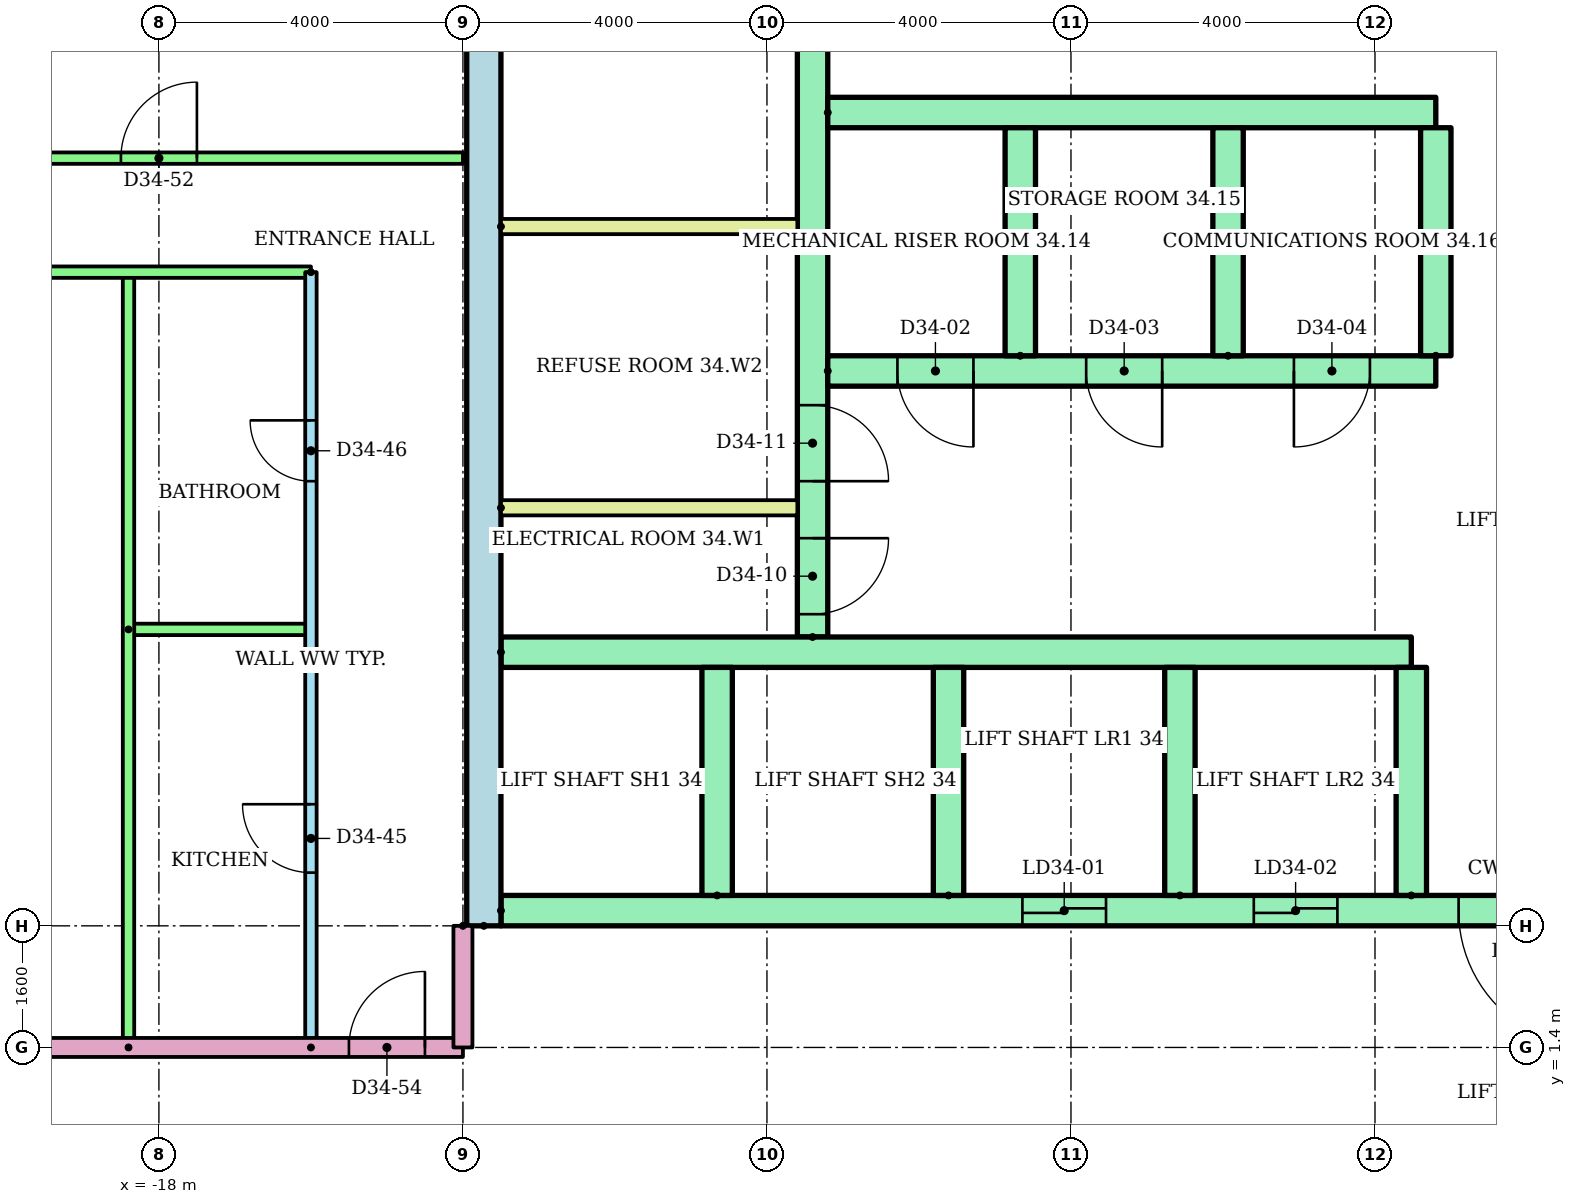
"""IFC4 building model, lengths in metres.
Left out: names, types, materials, properties, quantities, classifications, styles, units other than length and angle.
Written with IfcOpenShell. Run it as: python <this file> out.ifc"""

import sys

from ifc_helpers import new_model, si_unit, direction, frame, frame_2d, origin, place, context, subcontext, project, spatial, rectangle, extrude, element, fill, save


model = new_model("IFC4")
c1 = context("Model", 3, precision=1e-05, world=origin(), true_north=direction((0.0, 1.0)))
c2 = subcontext(c1, "Body", "Model", "MODEL_VIEW")
j1 = project(units=[si_unit("LENGTHUNIT", "METRE"), si_unit("PLANEANGLEUNIT", "RADIAN")], contexts=[c1])
p1 = place(None, origin())
s1 = spatial("IfcSite", under=j1, at=p1, CompositionType="ELEMENT")
p2 = place(p1, origin())
s2 = spatial("IfcBuilding", under=s1, at=p2, CompositionType="ELEMENT")
p3 = place(p2, frame((0.0, 0.0, 132.6)))
s3 = spatial("IfcBuildingStorey", under=s2, at=p3, CompositionType="ELEMENT", Elevation=132.6)
p4 = place(p3, frame((-13.725, 3.0, 0.0), z_axis=(0.0, 0.0, 1.0), x_axis=(0.0, 1.0, 0.0)))
e1 = element("IfcWall", 1, at=p4, inside=s3, PredefinedType="SHEAR", context=c2, shape_type="SweptSolid", body=[
    extrude(rectangle(XDim=17.0, YDim=0.45, at=frame_2d((8.5, 0.0))), origin(), (0.0, 0.0, 1.0), 2.92),
])
p5 = place(p3, frame((-9.4, 6.8, 0.0), z_axis=(0.0, 0.0, 1.0), x_axis=(0.0, 1.0, 0.0)))
e2 = element("IfcWall", 2, at=p5, inside=s3, PredefinedType="SHEAR", context=c2, shape_type="SweptSolid", body=[
    extrude(rectangle(XDim=12.7, YDim=0.4, at=frame_2d((6.35, 0.0))), origin(), (0.0, 0.0, 1.0), 2.92),
])
p6 = place(p5, frame((0.3, 0.0, 0.0)))
e3 = element("IfcOpeningElement", 3, at=p6, cuts=e2, PredefinedType="OPENING", context=c2, shape_type="SweptSolid", body=[
    extrude(rectangle(XDim=1.0, YDim=2.1, at=frame_2d((0.5, 1.05))), frame((0.0, 0.21, 0.0), z_axis=(0.0, -1.0, 0.0), x_axis=(1.0, 0.0, 0.0)), (0.0, 0.0, 1.0), 0.42),
])
p7 = place(p5, frame((2.05, 0.0, 0.0)))
e4 = element("IfcOpeningElement", 4, at=p7, cuts=e2, PredefinedType="OPENING", context=c2, shape_type="SweptSolid", body=[
    extrude(rectangle(XDim=1.0, YDim=2.1, at=frame_2d((0.5, 1.05))), frame((0.0, 0.21, 0.0), z_axis=(0.0, -1.0, 0.0), x_axis=(1.0, 0.0, 0.0)), (0.0, 0.0, 1.0), 0.42),
])
p8 = place(p5, frame((7.925, 0.0, 0.0)))
e5 = element("IfcOpeningElement", 5, at=p8, cuts=e2, PredefinedType="OPENING", context=c2, shape_type="SweptSolid", body=[
    extrude(rectangle(XDim=1.0, YDim=2.1, at=frame_2d((0.5, 1.05))), frame((0.0, 0.21, 0.0), z_axis=(0.0, -1.0, 0.0), x_axis=(1.0, 0.0, 0.0)), (0.0, 0.0, 1.0), 0.42),
])
p9 = place(p3, frame((-13.5, 3.2, 0.0)))
e6 = element("IfcWall", 6, at=p9, inside=s3, PredefinedType="SHEAR", context=c2, shape_type="SweptSolid", body=[
    extrude(rectangle(XDim=27.0, YDim=0.4, at=frame_2d((13.5, 0.0))), origin(), (0.0, 0.0, 1.0), 2.92),
])
p10 = place(p9, frame((6.861, 0.0, 0.0)))
e7 = element("IfcOpeningElement", 7, at=p10, cuts=e6, PredefinedType="OPENING", context=c2, shape_type="SweptSolid", body=[
    extrude(rectangle(XDim=1.1, YDim=2.1, at=frame_2d((0.55, 1.05))), frame((0.0, 0.21, 0.0), z_axis=(0.0, -1.0, 0.0), x_axis=(1.0, 0.0, 0.0)), (0.0, 0.0, 1.0), 0.42),
])
p11 = place(p9, frame((9.906, 0.0, 0.0)))
e8 = element("IfcOpeningElement", 8, at=p11, cuts=e6, PredefinedType="OPENING", context=c2, shape_type="SweptSolid", body=[
    extrude(rectangle(XDim=1.1, YDim=2.1, at=frame_2d((0.55, 1.05))), frame((0.0, 0.21, 0.0), z_axis=(0.0, -1.0, 0.0), x_axis=(1.0, 0.0, 0.0)), (0.0, 0.0, 1.0), 0.42),
])
p12 = place(p9, frame((15.994, 0.0, 0.0)))
e9 = element("IfcOpeningElement", 9, at=p12, cuts=e6, PredefinedType="OPENING", context=c2, shape_type="SweptSolid", body=[
    extrude(rectangle(XDim=1.1, YDim=2.1, at=frame_2d((0.55, 1.05))), frame((0.0, 0.21, 0.0), z_axis=(0.0, -1.0, 0.0), x_axis=(1.0, 0.0, 0.0)), (0.0, 0.0, 1.0), 0.42),
])
p13 = place(p9, frame((19.039, 0.0, 0.0)))
e10 = element("IfcOpeningElement", 10, at=p13, cuts=e6, PredefinedType="OPENING", context=c2, shape_type="SweptSolid", body=[
    extrude(rectangle(XDim=1.1, YDim=2.1, at=frame_2d((0.55, 1.05))), frame((0.0, 0.21, 0.0), z_axis=(0.0, -1.0, 0.0), x_axis=(1.0, 0.0, 0.0)), (0.0, 0.0, 1.0), 0.42),
])
p14 = place(p9, frame((12.6, 0.0, 0.0)))
e11 = element("IfcOpeningElement", 11, at=p14, cuts=e6, PredefinedType="OPENING", context=c2, shape_type="SweptSolid", body=[
    extrude(rectangle(XDim=1.8, YDim=2.1, at=frame_2d((0.9, 1.05))), frame((0.0, 0.21, 0.0), z_axis=(0.0, -1.0, 0.0), x_axis=(1.0, 0.0, 0.0)), (0.0, 0.0, 1.0), 0.42),
])
p15 = place(p3, frame((-13.5, 6.6, 0.0)))
e12 = element("IfcWall", 12, at=p15, inside=s3, PredefinedType="SHEAR", context=c2, shape_type="SweptSolid", body=[
    extrude(rectangle(XDim=11.978, YDim=0.4, at=frame_2d((5.989, 0.0))), origin(), (0.0, 0.0, 1.0), 2.92),
])
for number, where, z_axis, x_axis in (
    (13, (-10.656, 3.4, 0.0), (0.0, 0.0, 1.0), (0.0, 1.0, 0.0)),
    (14, (-7.611, 3.4, 0.0), (0.0, 0.0, 1.0), (0.0, 1.0, 0.0)),
    (15, (-4.567, 3.4, 0.0), (0.0, 0.0, 1.0), (0.0, 1.0, 0.0)),
    (16, (-1.522, 3.4, 0.0), (0.0, 0.0, 1.0), (0.0, 1.0, 0.0)),
):
    element("IfcWall", number, at=place(p3, frame(where, z_axis=z_axis, x_axis=x_axis)), inside=s3, PredefinedType="SHEAR", context=c2, shape_type="SweptSolid", body=[
        extrude(rectangle(XDim=3.0, YDim=0.4, at=frame_2d((1.5, 0.0))), origin(), (0.0, 0.0, 1.0), 2.92),
    ])
p16 = place(p3, frame((-9.2, 10.3, 0.0)))
e17 = element("IfcWall", 17, at=p16, inside=s3, PredefinedType="SHEAR", context=c2, shape_type="SweptSolid", body=[
    extrude(rectangle(XDim=8.0, YDim=0.4, at=frame_2d((4.0, 0.0))), origin(), (0.0, 0.0, 1.0), 2.92),
])
p17 = place(p16, frame((0.917, 0.0, 0.0)))
e18 = element("IfcOpeningElement", 18, at=p17, cuts=e17, PredefinedType="OPENING", context=c2, shape_type="SweptSolid", body=[
    extrude(rectangle(XDim=1.0, YDim=2.1, at=frame_2d((0.5, 1.05))), frame((0.0, 0.21, 0.0), z_axis=(0.0, -1.0, 0.0), x_axis=(1.0, 0.0, 0.0)), (0.0, 0.0, 1.0), 0.42),
])
p18 = place(p16, frame((3.4, 0.0, 0.0)))
e19 = element("IfcOpeningElement", 19, at=p18, cuts=e17, PredefinedType="OPENING", context=c2, shape_type="SweptSolid", body=[
    extrude(rectangle(XDim=1.0, YDim=2.1, at=frame_2d((0.5, 1.05))), frame((0.0, 0.21, 0.0), z_axis=(0.0, -1.0, 0.0), x_axis=(1.0, 0.0, 0.0)), (0.0, 0.0, 1.0), 0.42),
])
p19 = place(p16, frame((6.133, 0.0, 0.0)))
e20 = element("IfcOpeningElement", 20, at=p19, cuts=e17, PredefinedType="OPENING", context=c2, shape_type="SweptSolid", body=[
    extrude(rectangle(XDim=1.0, YDim=2.1, at=frame_2d((0.5, 1.05))), frame((0.0, 0.21, 0.0), z_axis=(0.0, -1.0, 0.0), x_axis=(1.0, 0.0, 0.0)), (0.0, 0.0, 1.0), 0.42),
])
p20 = place(p3, frame((-9.2, 13.7, 0.0)))
e21 = element("IfcWall", 21, at=p20, inside=s3, PredefinedType="SHEAR", context=c2, shape_type="SweptSolid", body=[
    extrude(rectangle(XDim=8.0, YDim=0.4, at=frame_2d((4.0, 0.0))), origin(), (0.0, 0.0, 1.0), 2.92),
])
for number, where, z_axis, x_axis in (
    (22, (-6.667, 10.5, 0.0), (0.0, 0.0, 1.0), (0.0, 1.0, 0.0)),
    (23, (-3.933, 10.5, 0.0), (0.0, 0.0, 1.0), (0.0, 1.0, 0.0)),
    (24, (-1.2, 10.5, 0.0), (0.0, 0.0, 1.0), (0.0, 1.0, 0.0)),
):
    element("IfcWall", number, at=place(p3, frame(where, z_axis=z_axis, x_axis=x_axis)), inside=s3, PredefinedType="SHEAR", context=c2, shape_type="SweptSolid", body=[
        extrude(rectangle(XDim=3.0, YDim=0.4, at=frame_2d((1.5, 0.0))), origin(), (0.0, 0.0, 1.0), 2.92),
    ])
for number, where in (
    (25, (-13.5, 8.5, 0.0)),
    (26, (-13.5, 12.2, 0.0)),
):
    element("IfcWall", number, at=place(p3, frame(where)), inside=s3, PredefinedType="PARTITIONING", context=c2, shape_type="SweptSolid", body=[
        extrude(rectangle(XDim=3.9, YDim=0.2, at=frame_2d((1.95, 0.0))), origin(), (0.0, 0.0, 1.0), 2.92),
    ])
p21 = place(p3, frame((-16.0, 1.4, 0.0), z_axis=(0.0, 0.0, 1.0), x_axis=(0.0, 1.0, 0.0)))
e27 = element("IfcWall", 27, at=p21, inside=s3, PredefinedType="PARTITIONING", context=c2, shape_type="SweptSolid", body=[
    extrude(rectangle(XDim=10.2, YDim=0.15, at=frame_2d((5.1, 0.0))), origin(), (0.0, 0.0, 1.0), 2.4),
])
p22 = place(p21, frame((2.3, 0.0, 0.0)))
e28 = element("IfcOpeningElement", 28, at=p22, cuts=e27, PredefinedType="OPENING", context=c2, shape_type="SweptSolid", body=[
    extrude(rectangle(XDim=0.9, YDim=2.1, at=frame_2d((0.45, 1.05))), frame((0.0, 0.085, 0.0), z_axis=(0.0, -1.0, 0.0), x_axis=(1.0, 0.0, 0.0)), (0.0, 0.0, 1.0), 0.17),
])
p23 = place(p21, frame((7.45, 0.0, 0.0)))
e29 = element("IfcOpeningElement", 29, at=p23, cuts=e27, PredefinedType="OPENING", context=c2, shape_type="SweptSolid", body=[
    extrude(rectangle(XDim=0.8, YDim=2.1, at=frame_2d((0.4, 1.05))), frame((0.0, 0.085, 0.0), z_axis=(0.0, -1.0, 0.0), x_axis=(1.0, 0.0, 0.0)), (0.0, 0.0, 1.0), 0.17),
])
p24 = place(p3, frame((-18.4, 6.9, 0.0)))
e30 = element("IfcWall", 30, at=p24, inside=s3, PredefinedType="PARTITIONING", context=c2, shape_type="SweptSolid", body=[
    extrude(rectangle(XDim=2.4, YDim=0.15, at=frame_2d((1.2, 0.0))), origin(), (0.0, 0.0, 1.0), 2.4),
])
p25 = place(p3, frame((-18.4, 1.4, 0.0), z_axis=(0.0, 0.0, 1.0), x_axis=(0.0, 1.0, 0.0)))
e31 = element("IfcWall", 31, at=p25, inside=s3, PredefinedType="PARTITIONING", context=c2, shape_type="SweptSolid", body=[
    extrude(rectangle(XDim=10.2, YDim=0.15, at=frame_2d((5.1, 0.0))), origin(), (0.0, 0.0, 1.0), 2.4),
])
p26 = place(p3, frame((-16.0, 11.6, 0.0), z_axis=(0.0, 0.0, 1.0), x_axis=(-1.0, 0.0, 0.0)))
e32 = element("IfcWall", 32, at=p26, inside=s3, PredefinedType="PARTITIONING", context=c2, shape_type="SweptSolid", body=[
    extrude(rectangle(XDim=16.72, YDim=0.15, at=frame_2d((8.36, 0.0))), origin(), (0.0, 0.0, 1.0), 2.4),
])
p27 = place(p26, frame((4.482, 0.0, 0.0)))
e33 = element("IfcOpeningElement", 33, at=p27, cuts=e32, PredefinedType="OPENING", context=c2, shape_type="SweptSolid", body=[
    extrude(rectangle(XDim=0.9, YDim=2.1, at=frame_2d((0.45, 1.05))), frame((0.0, 0.085, 0.0), z_axis=(0.0, -1.0, 0.0), x_axis=(1.0, 0.0, 0.0)), (0.0, 0.0, 1.0), 0.17),
])
p28 = place(p26, frame((10.325, 0.0, 0.0)))
e34 = element("IfcOpeningElement", 34, at=p28, cuts=e32, PredefinedType="OPENING", context=c2, shape_type="SweptSolid", body=[
    extrude(rectangle(XDim=0.9, YDim=2.1, at=frame_2d((0.45, 1.05))), frame((0.0, 0.085, 0.0), z_axis=(0.0, -1.0, 0.0), x_axis=(1.0, 0.0, 0.0)), (0.0, 0.0, 1.0), 0.17),
])
p29 = place(p26, frame((14.618, 0.0, 0.0)))
e35 = element("IfcOpeningElement", 35, at=p29, cuts=e32, PredefinedType="OPENING", context=c2, shape_type="SweptSolid", body=[
    extrude(rectangle(XDim=0.9, YDim=2.1, at=frame_2d((0.45, 1.05))), frame((0.0, 0.085, 0.0), z_axis=(0.0, -1.0, 0.0), x_axis=(1.0, 0.0, 0.0)), (0.0, 0.0, 1.0), 0.17),
])
p30 = place(p3, frame((-32.72, 13.1, 0.0)))
e36 = element("IfcWall", 36, at=p30, inside=s3, PredefinedType="PARTITIONING", context=c2, shape_type="SweptSolid", body=[
    extrude(rectangle(XDim=18.72, YDim=0.15, at=frame_2d((9.36, 0.0))), origin(), (0.0, 0.0, 1.0), 2.4),
])
p31 = place(p30, frame((2.02, 0.0, 0.0)))
e37 = element("IfcOpeningElement", 37, at=p31, cuts=e36, PredefinedType="OPENING", context=c2, shape_type="SweptSolid", body=[
    extrude(rectangle(XDim=0.9, YDim=2.1, at=frame_2d((0.45, 1.05))), frame((0.0, 0.085, 0.0), z_axis=(0.0, -1.0, 0.0), x_axis=(1.0, 0.0, 0.0)), (0.0, 0.0, 1.0), 0.17),
])
p32 = place(p30, frame((7.47, 0.0, 0.0)))
e38 = element("IfcOpeningElement", 38, at=p32, cuts=e36, PredefinedType="OPENING", context=c2, shape_type="SweptSolid", body=[
    extrude(rectangle(XDim=0.9, YDim=2.1, at=frame_2d((0.45, 1.05))), frame((0.0, 0.085, 0.0), z_axis=(0.0, -1.0, 0.0), x_axis=(1.0, 0.0, 0.0)), (0.0, 0.0, 1.0), 0.17),
])
p33 = place(p30, frame((14.22, 0.0, 0.0)))
e39 = element("IfcOpeningElement", 39, at=p33, cuts=e36, PredefinedType="OPENING", context=c2, shape_type="SweptSolid", body=[
    extrude(rectangle(XDim=1.0, YDim=2.1, at=frame_2d((0.5, 1.05))), frame((0.0, 0.085, 0.0), z_axis=(0.0, -1.0, 0.0), x_axis=(1.0, 0.0, 0.0)), (0.0, 0.0, 1.0), 0.17),
])
p34 = place(p3, frame((-29.0, 1.4, 0.0)))
e40 = element("IfcWall", 40, at=p34, inside=s3, PredefinedType="PARTITIONING", context=c2, shape_type="SweptSolid", body=[
    extrude(rectangle(XDim=15.0, YDim=0.25, at=frame_2d((7.5, 0.0))), origin(), (0.0, 0.0, 1.0), 2.4),
])
p35 = place(p34, frame((13.5, 0.0, 0.0)))
e41 = element("IfcOpeningElement", 41, at=p35, cuts=e40, PredefinedType="OPENING", context=c2, shape_type="SweptSolid", body=[
    extrude(rectangle(XDim=1.0, YDim=2.1, at=frame_2d((0.5, 1.05))), frame((0.0, 0.135, 0.0), z_axis=(0.0, -1.0, 0.0), x_axis=(1.0, 0.0, 0.0)), (0.0, 0.0, 1.0), 0.27),
])
p36 = place(p3, frame((-14.0, 3.0, 0.0), z_axis=(0.0, 0.0, 1.0), x_axis=(0.0, -1.0, 0.0)))
e42 = element("IfcWall", 42, at=p36, inside=s3, PredefinedType="PARTITIONING", context=c2, shape_type="SweptSolid", body=[
    extrude(rectangle(XDim=1.6, YDim=0.25, at=frame_2d((0.8, 0.0))), origin(), (0.0, 0.0, 1.0), 2.4),
])
p37 = place(p10, origin())
e43 = element("IfcDoor", 43, at=p37, inside=s3, OperationType="SLIDING_TO_LEFT", PredefinedType="DOOR", context=c2, shape_type="SweptSolid", body=[
    extrude(rectangle(XDim=1.1, YDim=2.1, at=frame_2d((0.55, 1.05))), frame((0.0, 0.025, 0.0), z_axis=(0.0, -1.0, 0.0), x_axis=(1.0, 0.0, 0.0)), (0.0, 0.0, 1.0), 0.05),
])
fill(e7, e43)
p38 = place(p11, origin())
e44 = element("IfcDoor", 44, at=p38, inside=s3, OperationType="SLIDING_TO_LEFT", PredefinedType="DOOR", context=c2, shape_type="SweptSolid", body=[
    extrude(rectangle(XDim=1.1, YDim=2.1, at=frame_2d((0.55, 1.05))), frame((0.0, 0.025, 0.0), z_axis=(0.0, -1.0, 0.0), x_axis=(1.0, 0.0, 0.0)), (0.0, 0.0, 1.0), 0.05),
])
fill(e8, e44)
p39 = place(p14, frame((1.8, 0.0, 0.0), z_axis=(0.0, 0.0, 1.0), x_axis=(-1.0, 0.0, 0.0)))
e45 = element("IfcDoor", 45, at=p39, inside=s3, OperationType="DOUBLE_DOOR_SINGLE_SWING", PredefinedType="DOOR", context=c2, shape_type="SweptSolid", body=[
    extrude(rectangle(XDim=1.8, YDim=2.1, at=frame_2d((0.9, 1.05))), frame((0.0, 0.025, 0.0), z_axis=(0.0, -1.0, 0.0), x_axis=(1.0, 0.0, 0.0)), (0.0, 0.0, 1.0), 0.05),
])
fill(e11, e45)
p40 = place(p17, frame((1.0, 0.0, 0.0), z_axis=(0.0, 0.0, 1.0), x_axis=(-1.0, 0.0, 0.0)))
e46 = element("IfcDoor", 46, at=p40, inside=s3, OperationType="SINGLE_SWING_RIGHT", PredefinedType="DOOR", context=c2, shape_type="SweptSolid", body=[
    extrude(rectangle(XDim=1.0, YDim=2.1, at=frame_2d((0.5, 1.05))), frame((0.0, 0.025, 0.0), z_axis=(0.0, -1.0, 0.0), x_axis=(1.0, 0.0, 0.0)), (0.0, 0.0, 1.0), 0.05),
])
fill(e18, e46)
p41 = place(p18, frame((1.0, 0.0, 0.0), z_axis=(0.0, 0.0, 1.0), x_axis=(-1.0, 0.0, 0.0)))
e47 = element("IfcDoor", 47, at=p41, inside=s3, OperationType="SINGLE_SWING_RIGHT", PredefinedType="DOOR", context=c2, shape_type="SweptSolid", body=[
    extrude(rectangle(XDim=1.0, YDim=2.1, at=frame_2d((0.5, 1.05))), frame((0.0, 0.025, 0.0), z_axis=(0.0, -1.0, 0.0), x_axis=(1.0, 0.0, 0.0)), (0.0, 0.0, 1.0), 0.05),
])
fill(e19, e47)
p42 = place(p19, frame((1.0, 0.0, 0.0), z_axis=(0.0, 0.0, 1.0), x_axis=(-1.0, 0.0, 0.0)))
e48 = element("IfcDoor", 48, at=p42, inside=s3, OperationType="SINGLE_SWING_LEFT", PredefinedType="DOOR", context=c2, shape_type="SweptSolid", body=[
    extrude(rectangle(XDim=1.0, YDim=2.1, at=frame_2d((0.5, 1.05))), frame((0.0, 0.025, 0.0), z_axis=(0.0, -1.0, 0.0), x_axis=(1.0, 0.0, 0.0)), (0.0, 0.0, 1.0), 0.05),
])
fill(e20, e48)
p43 = place(p6, frame((1.0, 0.0, 0.0), z_axis=(0.0, 0.0, 1.0), x_axis=(-1.0, 0.0, 0.0)))
e49 = element("IfcDoor", 49, at=p43, inside=s3, OperationType="SINGLE_SWING_RIGHT", PredefinedType="DOOR", context=c2, shape_type="SweptSolid", body=[
    extrude(rectangle(XDim=1.0, YDim=2.1, at=frame_2d((0.5, 1.05))), frame((0.0, 0.025, 0.0), z_axis=(0.0, -1.0, 0.0), x_axis=(1.0, 0.0, 0.0)), (0.0, 0.0, 1.0), 0.05),
])
fill(e3, e49)
p44 = place(p7, frame((1.0, 0.0, 0.0), z_axis=(0.0, 0.0, 1.0), x_axis=(-1.0, 0.0, 0.0)))
e50 = element("IfcDoor", 50, at=p44, inside=s3, OperationType="SINGLE_SWING_LEFT", PredefinedType="DOOR", context=c2, shape_type="SweptSolid", body=[
    extrude(rectangle(XDim=1.0, YDim=2.1, at=frame_2d((0.5, 1.05))), frame((0.0, 0.025, 0.0), z_axis=(0.0, -1.0, 0.0), x_axis=(1.0, 0.0, 0.0)), (0.0, 0.0, 1.0), 0.05),
])
fill(e4, e50)
p45 = place(p22, origin())
e51 = element("IfcDoor", 51, at=p45, inside=s3, OperationType="SINGLE_SWING_RIGHT", PredefinedType="DOOR", context=c2, shape_type="SweptSolid", body=[
    extrude(rectangle(XDim=0.9, YDim=2.1, at=frame_2d((0.45, 1.05))), frame((0.0, 0.025, 0.0), z_axis=(0.0, -1.0, 0.0), x_axis=(1.0, 0.0, 0.0)), (0.0, 0.0, 1.0), 0.05),
])
fill(e28, e51)
p46 = place(p23, origin())
e52 = element("IfcDoor", 52, at=p46, inside=s3, OperationType="SINGLE_SWING_RIGHT", PredefinedType="DOOR", context=c2, shape_type="SweptSolid", body=[
    extrude(rectangle(XDim=0.8, YDim=2.1, at=frame_2d((0.4, 1.05))), frame((0.0, 0.025, 0.0), z_axis=(0.0, -1.0, 0.0), x_axis=(1.0, 0.0, 0.0)), (0.0, 0.0, 1.0), 0.05),
])
fill(e29, e52)
p47 = place(p33, origin())
e53 = element("IfcDoor", 53, at=p47, inside=s3, OperationType="SINGLE_SWING_RIGHT", PredefinedType="DOOR", context=c2, shape_type="SweptSolid", body=[
    extrude(rectangle(XDim=1.0, YDim=2.1, at=frame_2d((0.5, 1.05))), frame((0.0, 0.025, 0.0), z_axis=(0.0, -1.0, 0.0), x_axis=(1.0, 0.0, 0.0)), (0.0, 0.0, 1.0), 0.05),
])
fill(e39, e53)
p48 = place(p35, origin())
e54 = element("IfcDoor", 54, at=p48, inside=s3, OperationType="SINGLE_SWING_RIGHT", PredefinedType="DOOR", context=c2, shape_type="SweptSolid", body=[
    extrude(rectangle(XDim=1.0, YDim=2.1, at=frame_2d((0.5, 1.05))), frame((0.0, 0.025, 0.0), z_axis=(0.0, -1.0, 0.0), x_axis=(1.0, 0.0, 0.0)), (0.0, 0.0, 1.0), 0.05),
])
fill(e41, e54)
save(model, sys.argv[1])
